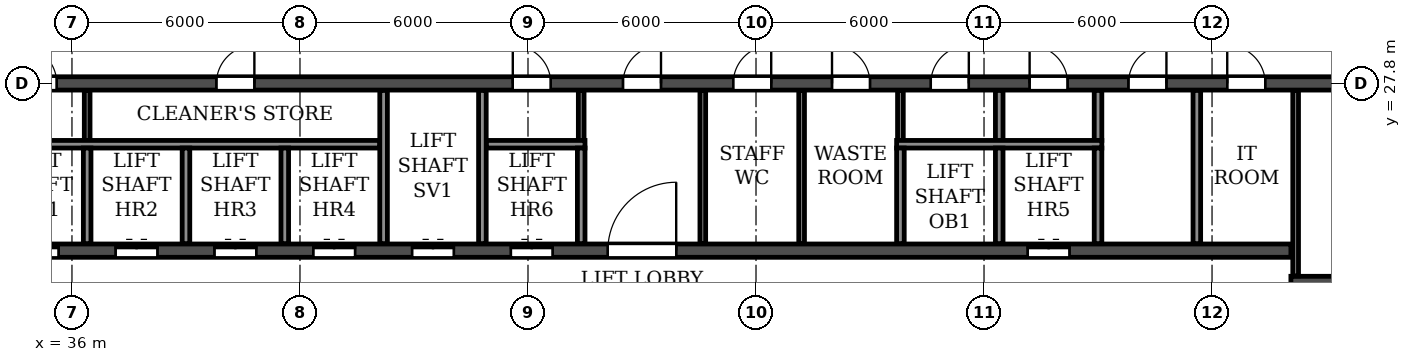
"""IFC4 building model, lengths in metres.
Left out: names, types, materials, properties, quantities, classifications, styles, units other than length and angle.
Written with IfcOpenShell. Run it as: python <this file> out.ifc"""

import sys

from ifc_helpers import new_model, si_unit, direction, frame, frame_2d, origin, place, context, subcontext, project, spatial, rectangle, extrude, element, fill, save


model = new_model("IFC4")
c1 = context("Model", 3, precision=1e-05, world=origin(), true_north=direction((0.0, 1.0)))
c2 = subcontext(c1, "Body", "Model", "MODEL_VIEW")
j1 = project(units=[si_unit("LENGTHUNIT", "METRE"), si_unit("PLANEANGLEUNIT", "RADIAN")], contexts=[c1])
p1 = place(None, origin())
s1 = spatial("IfcSite", under=j1, at=p1, CompositionType="ELEMENT")
p2 = place(p1, origin())
s2 = spatial("IfcBuilding", under=s1, at=p2, CompositionType="ELEMENT")
p3 = place(p2, frame((0.0, 0.0, 231.3)))
s3 = spatial("IfcBuildingStorey", under=s2, at=p3, CompositionType="ELEMENT", Elevation=231.3)
p4 = place(p3, frame((18.2, 27.8, 0.0), z_axis=(0.0, 0.0, 1.0), x_axis=(1.0, 0.0, 0.0)))
e1 = element("IfcWall", 1, at=p4, inside=s3, PredefinedType="SOLIDWALL", context=c2, shape_type="SweptSolid", body=[
    extrude(rectangle(XDim=65.6, YDim=0.35, at=frame_2d((32.8, 0.0))), origin(), (0.0, 0.0, 1.0), 3.08),
])
p5 = place(p4, frame((0.7, 0.0, 0.0)))
e2 = element("IfcOpeningElement", 2, at=p5, cuts=e1, PredefinedType="OPENING", context=c2, shape_type="SweptSolid", body=[
    extrude(rectangle(XDim=1.0, YDim=2.1, at=frame_2d((0.5, 1.05))), frame((0.0, 0.185, 0.0), z_axis=(0.0, -1.0, 0.0), x_axis=(1.0, 0.0, 0.0)), (0.0, 0.0, 1.0), 0.37),
])
p6 = place(p4, frame((4.05, 0.0, 0.0)))
e3 = element("IfcOpeningElement", 3, at=p6, cuts=e1, PredefinedType="OPENING", context=c2, shape_type="SweptSolid", body=[
    extrude(rectangle(XDim=0.9, YDim=2.1, at=frame_2d((0.45, 1.05))), frame((0.0, 0.185, 0.0), z_axis=(0.0, -1.0, 0.0), x_axis=(1.0, 0.0, 0.0)), (0.0, 0.0, 1.0), 0.37),
])
p7 = place(p4, frame((13.25, 0.0, 0.0)))
e4 = element("IfcOpeningElement", 4, at=p7, cuts=e1, PredefinedType="OPENING", context=c2, shape_type="SweptSolid", body=[
    extrude(rectangle(XDim=0.9, YDim=2.1, at=frame_2d((0.45, 1.05))), frame((0.0, 0.185, 0.0), z_axis=(0.0, -1.0, 0.0), x_axis=(1.0, 0.0, 0.0)), (0.0, 0.0, 1.0), 0.37),
])
p8 = place(p4, frame((16.4, 0.0, 0.0)))
e5 = element("IfcOpeningElement", 5, at=p8, cuts=e1, PredefinedType="OPENING", context=c2, shape_type="SweptSolid", body=[
    extrude(rectangle(XDim=1.0, YDim=2.1, at=frame_2d((0.5, 1.05))), frame((0.0, 0.185, 0.0), z_axis=(0.0, -1.0, 0.0), x_axis=(1.0, 0.0, 0.0)), (0.0, 0.0, 1.0), 0.37),
])
p9 = place(p4, frame((21.6, 0.0, 0.0)))
e6 = element("IfcOpeningElement", 6, at=p9, cuts=e1, PredefinedType="OPENING", context=c2, shape_type="SweptSolid", body=[
    extrude(rectangle(XDim=1.0, YDim=2.1, at=frame_2d((0.5, 1.05))), frame((0.0, 0.185, 0.0), z_axis=(0.0, -1.0, 0.0), x_axis=(1.0, 0.0, 0.0)), (0.0, 0.0, 1.0), 0.37),
])
p10 = place(p4, frame((29.4, 0.0, 0.0)))
e7 = element("IfcOpeningElement", 7, at=p10, cuts=e1, PredefinedType="OPENING", context=c2, shape_type="SweptSolid", body=[
    extrude(rectangle(XDim=1.0, YDim=2.1, at=frame_2d((0.5, 1.05))), frame((0.0, 0.185, 0.0), z_axis=(0.0, -1.0, 0.0), x_axis=(1.0, 0.0, 0.0)), (0.0, 0.0, 1.0), 0.37),
])
p11 = place(p4, frame((32.3, 0.0, 0.0)))
e8 = element("IfcOpeningElement", 8, at=p11, cuts=e1, PredefinedType="OPENING", context=c2, shape_type="SweptSolid", body=[
    extrude(rectangle(XDim=1.0, YDim=2.1, at=frame_2d((0.5, 1.05))), frame((0.0, 0.185, 0.0), z_axis=(0.0, -1.0, 0.0), x_axis=(1.0, 0.0, 0.0)), (0.0, 0.0, 1.0), 0.37),
])
p12 = place(p4, frame((35.2, 0.0, 0.0)))
e9 = element("IfcOpeningElement", 9, at=p12, cuts=e1, PredefinedType="OPENING", context=c2, shape_type="SweptSolid", body=[
    extrude(rectangle(XDim=1.0, YDim=2.1, at=frame_2d((0.5, 1.05))), frame((0.0, 0.185, 0.0), z_axis=(0.0, -1.0, 0.0), x_axis=(1.0, 0.0, 0.0)), (0.0, 0.0, 1.0), 0.37),
])
p13 = place(p4, frame((37.8, 0.0, 0.0)))
e10 = element("IfcOpeningElement", 10, at=p13, cuts=e1, PredefinedType="OPENING", context=c2, shape_type="SweptSolid", body=[
    extrude(rectangle(XDim=1.0, YDim=2.1, at=frame_2d((0.5, 1.05))), frame((0.0, 0.185, 0.0), z_axis=(0.0, -1.0, 0.0), x_axis=(1.0, 0.0, 0.0)), (0.0, 0.0, 1.0), 0.37),
])
p14 = place(p4, frame((40.4, 0.0, 0.0)))
e11 = element("IfcOpeningElement", 11, at=p14, cuts=e1, PredefinedType="OPENING", context=c2, shape_type="SweptSolid", body=[
    extrude(rectangle(XDim=1.0, YDim=2.1, at=frame_2d((0.5, 1.05))), frame((0.0, 0.185, 0.0), z_axis=(0.0, -1.0, 0.0), x_axis=(1.0, 0.0, 0.0)), (0.0, 0.0, 1.0), 0.37),
])
p15 = place(p4, frame((43.0, 0.0, 0.0)))
e12 = element("IfcOpeningElement", 12, at=p15, cuts=e1, PredefinedType="OPENING", context=c2, shape_type="SweptSolid", body=[
    extrude(rectangle(XDim=1.0, YDim=2.1, at=frame_2d((0.5, 1.05))), frame((0.0, 0.185, 0.0), z_axis=(0.0, -1.0, 0.0), x_axis=(1.0, 0.0, 0.0)), (0.0, 0.0, 1.0), 0.37),
])
p16 = place(p4, frame((45.6, 0.0, 0.0)))
e13 = element("IfcOpeningElement", 13, at=p16, cuts=e1, PredefinedType="OPENING", context=c2, shape_type="SweptSolid", body=[
    extrude(rectangle(XDim=1.0, YDim=2.1, at=frame_2d((0.5, 1.05))), frame((0.0, 0.185, 0.0), z_axis=(0.0, -1.0, 0.0), x_axis=(1.0, 0.0, 0.0)), (0.0, 0.0, 1.0), 0.37),
])
p17 = place(p4, frame((48.2, 0.0, 0.0)))
e14 = element("IfcOpeningElement", 14, at=p17, cuts=e1, PredefinedType="OPENING", context=c2, shape_type="SweptSolid", body=[
    extrude(rectangle(XDim=1.0, YDim=2.1, at=frame_2d((0.5, 1.05))), frame((0.0, 0.185, 0.0), z_axis=(0.0, -1.0, 0.0), x_axis=(1.0, 0.0, 0.0)), (0.0, 0.0, 1.0), 0.37),
])
p18 = place(p4, frame((51.45, 0.0, 0.0)))
e15 = element("IfcOpeningElement", 15, at=p18, cuts=e1, PredefinedType="OPENING", context=c2, shape_type="SweptSolid", body=[
    extrude(rectangle(XDim=0.9, YDim=2.1, at=frame_2d((0.45, 1.05))), frame((0.0, 0.185, 0.0), z_axis=(0.0, -1.0, 0.0), x_axis=(1.0, 0.0, 0.0)), (0.0, 0.0, 1.0), 0.37),
])
p19 = place(p4, frame((60.65, 0.0, 0.0)))
e16 = element("IfcOpeningElement", 16, at=p19, cuts=e1, PredefinedType="OPENING", context=c2, shape_type="SweptSolid", body=[
    extrude(rectangle(XDim=0.9, YDim=2.1, at=frame_2d((0.45, 1.05))), frame((0.0, 0.185, 0.0), z_axis=(0.0, -1.0, 0.0), x_axis=(1.0, 0.0, 0.0)), (0.0, 0.0, 1.0), 0.37),
])
p20 = place(p4, frame((63.9, 0.0, 0.0)))
e17 = element("IfcOpeningElement", 17, at=p20, cuts=e1, PredefinedType="OPENING", context=c2, shape_type="SweptSolid", body=[
    extrude(rectangle(XDim=1.0, YDim=2.1, at=frame_2d((0.5, 1.05))), frame((0.0, 0.185, 0.0), z_axis=(0.0, -1.0, 0.0), x_axis=(1.0, 0.0, 0.0)), (0.0, 0.0, 1.0), 0.37),
])
p21 = place(p3, frame((33.925, 23.4, 0.0), z_axis=(0.0, 0.0, 1.0), x_axis=(1.0, 0.0, 0.0)))
e18 = element("IfcWall", 18, at=p21, inside=s3, PredefinedType="SOLIDWALL", context=c2, shape_type="SweptSolid", body=[
    extrude(rectangle(XDim=34.15, YDim=0.35, at=frame_2d((17.075, 0.0))), origin(), (0.0, 0.0, 1.0), 3.08),
])
p22 = place(p21, frame((16.175, 0.0, 0.0)))
e19 = element("IfcOpeningElement", 19, at=p22, cuts=e18, PredefinedType="OPENING", context=c2, shape_type="SweptSolid", body=[
    extrude(rectangle(XDim=1.8, YDim=2.1, at=frame_2d((0.9, 1.05))), frame((0.0, 0.185, 0.0), z_axis=(0.0, -1.0, 0.0), x_axis=(1.0, 0.0, 0.0)), (0.0, 0.0, 1.0), 0.37),
])
p23 = place(p21, frame((0.625, 0.0, 0.0)))
e20 = element("IfcOpeningElement", 20, at=p23, cuts=e18, PredefinedType="OPENING", context=c2, shape_type="SweptSolid", body=[
    extrude(rectangle(XDim=1.1, YDim=2.1, at=frame_2d((0.55, 1.05))), frame((0.0, 0.185, 0.0), z_axis=(0.0, -1.0, 0.0), x_axis=(1.0, 0.0, 0.0)), (0.0, 0.0, 1.0), 0.37),
])
p24 = place(p21, frame((3.225, 0.0, 0.0)))
e21 = element("IfcOpeningElement", 21, at=p24, cuts=e18, PredefinedType="OPENING", context=c2, shape_type="SweptSolid", body=[
    extrude(rectangle(XDim=1.1, YDim=2.1, at=frame_2d((0.55, 1.05))), frame((0.0, 0.185, 0.0), z_axis=(0.0, -1.0, 0.0), x_axis=(1.0, 0.0, 0.0)), (0.0, 0.0, 1.0), 0.37),
])
p25 = place(p21, frame((5.825, 0.0, 0.0)))
e22 = element("IfcOpeningElement", 22, at=p25, cuts=e18, PredefinedType="OPENING", context=c2, shape_type="SweptSolid", body=[
    extrude(rectangle(XDim=1.1, YDim=2.1, at=frame_2d((0.55, 1.05))), frame((0.0, 0.185, 0.0), z_axis=(0.0, -1.0, 0.0), x_axis=(1.0, 0.0, 0.0)), (0.0, 0.0, 1.0), 0.37),
])
p26 = place(p21, frame((8.425, 0.0, 0.0)))
e23 = element("IfcOpeningElement", 23, at=p26, cuts=e18, PredefinedType="OPENING", context=c2, shape_type="SweptSolid", body=[
    extrude(rectangle(XDim=1.1, YDim=2.1, at=frame_2d((0.55, 1.05))), frame((0.0, 0.185, 0.0), z_axis=(0.0, -1.0, 0.0), x_axis=(1.0, 0.0, 0.0)), (0.0, 0.0, 1.0), 0.37),
])
p27 = place(p21, frame((11.025, 0.0, 0.0)))
e24 = element("IfcOpeningElement", 24, at=p27, cuts=e18, PredefinedType="OPENING", context=c2, shape_type="SweptSolid", body=[
    extrude(rectangle(XDim=1.1, YDim=2.1, at=frame_2d((0.55, 1.05))), frame((0.0, 0.185, 0.0), z_axis=(0.0, -1.0, 0.0), x_axis=(1.0, 0.0, 0.0)), (0.0, 0.0, 1.0), 0.37),
])
p28 = place(p21, frame((13.625, 0.0, 0.0)))
e25 = element("IfcOpeningElement", 25, at=p28, cuts=e18, PredefinedType="OPENING", context=c2, shape_type="SweptSolid", body=[
    extrude(rectangle(XDim=1.1, YDim=2.1, at=frame_2d((0.55, 1.05))), frame((0.0, 0.185, 0.0), z_axis=(0.0, -1.0, 0.0), x_axis=(1.0, 0.0, 0.0)), (0.0, 0.0, 1.0), 0.37),
])
p29 = place(p21, frame((27.225, 0.0, 0.0)))
e26 = element("IfcOpeningElement", 26, at=p29, cuts=e18, PredefinedType="OPENING", context=c2, shape_type="SweptSolid", body=[
    extrude(rectangle(XDim=1.1, YDim=2.1, at=frame_2d((0.55, 1.05))), frame((0.0, 0.185, 0.0), z_axis=(0.0, -1.0, 0.0), x_axis=(1.0, 0.0, 0.0)), (0.0, 0.0, 1.0), 0.37),
])
p30 = place(p3, frame((68.075, 22.6, 0.0), z_axis=(0.0, 0.0, 1.0), x_axis=(1.0, 0.0, 0.0)))
e27 = element("IfcWall", 27, at=p30, inside=s3, PredefinedType="SOLIDWALL", context=c2, shape_type="SweptSolid", body=[
    extrude(rectangle(XDim=4.05, YDim=0.25, at=frame_2d((2.025, 0.0))), origin(), (0.0, 0.0, 1.0), 3.08),
])
p31 = place(p3, frame((49.4, 26.3, 0.0), z_axis=(0.0, 0.0, 1.0), x_axis=(0.0, 1.0, 0.0)))
e28 = element("IfcWall", 28, at=p31, inside=s3, PredefinedType="PARTITIONING", context=c2, shape_type="SweptSolid", body=[
    extrude(rectangle(XDim=1.315, YDim=0.15, at=frame_2d((0.657, 0.0))), origin(), (0.0, 0.0, 1.0), 3.08),
])
p32 = place(p3, frame((52.6, 23.585, 0.0), z_axis=(0.0, 0.0, 1.0), x_axis=(0.0, 1.0, 0.0)))
e29 = element("IfcWall", 29, at=p32, inside=s3, PredefinedType="PARTITIONING", context=c2, shape_type="SweptSolid", body=[
    extrude(rectangle(XDim=4.03, YDim=0.15, at=frame_2d((2.015, 0.0))), origin(), (0.0, 0.0, 1.0), 3.08),
])
p33 = place(p3, frame((36.4, 26.3, 0.0), z_axis=(0.0, 0.0, 1.0), x_axis=(0.0, 1.0, 0.0)))
e30 = element("IfcWall", 30, at=p33, inside=s3, PredefinedType="PARTITIONING", context=c2, shape_type="SweptSolid", body=[
    extrude(rectangle(XDim=1.315, YDim=0.15, at=frame_2d((0.657, 0.0))), origin(), (0.0, 0.0, 1.0), 3.08),
])
p34 = place(p3, frame((55.2, 23.585, 0.0), z_axis=(0.0, 0.0, 1.0), x_axis=(0.0, 1.0, 0.0)))
e31 = element("IfcWall", 31, at=p34, inside=s3, PredefinedType="PARTITIONING", context=c2, shape_type="SweptSolid", body=[
    extrude(rectangle(XDim=4.03, YDim=0.15, at=frame_2d((2.015, 0.0))), origin(), (0.0, 0.0, 1.0), 3.08),
])
p35 = place(p3, frame((57.8, 26.3, 0.0), z_axis=(0.0, 0.0, 1.0), x_axis=(0.0, 1.0, 0.0)))
e32 = element("IfcWall", 32, at=p35, inside=s3, PredefinedType="PARTITIONING", context=c2, shape_type="SweptSolid", body=[
    extrude(rectangle(XDim=1.315, YDim=0.15, at=frame_2d((0.657, 0.0))), origin(), (0.0, 0.0, 1.0), 3.08),
])
for number, where, z_axis, x_axis in (
    (33, (60.4, 26.3, 0.0), (0.0, 0.0, 1.0), (0.0, 1.0, 0.0)),
    (34, (63.0, 26.3, 0.0), (0.0, 0.0, 1.0), (0.0, 1.0, 0.0)),
):
    element("IfcWall", number, at=place(p3, frame(where, z_axis=z_axis, x_axis=x_axis)), inside=s3, PredefinedType="PARTITIONING", context=c2, shape_type="SweptSolid", body=[
        extrude(rectangle(XDim=1.315, YDim=0.2, at=frame_2d((0.657, 0.0))), origin(), (0.0, 0.0, 1.0), 3.08),
    ])
p36 = place(p3, frame((65.6, 23.585, 0.0), z_axis=(0.0, 0.0, 1.0), x_axis=(0.0, 1.0, 0.0)))
e35 = element("IfcWall", 35, at=p36, inside=s3, PredefinedType="PARTITIONING", context=c2, shape_type="SweptSolid", body=[
    extrude(rectangle(XDim=4.03, YDim=0.2, at=frame_2d((2.015, 0.0))), origin(), (0.0, 0.0, 1.0), 3.08),
])
p37 = place(p3, frame((68.2, 22.735, 0.0), z_axis=(0.0, 0.0, 1.0), x_axis=(0.0, 1.0, 0.0)))
e36 = element("IfcWall", 36, at=p37, inside=s3, PredefinedType="PARTITIONING", context=c2, shape_type="SweptSolid", body=[
    extrude(rectangle(XDim=4.88, YDim=0.15, at=frame_2d((2.44, 0.0))), origin(), (0.0, 0.0, 1.0), 3.08),
])
p38 = place(p3, frame((33.7, 26.2, 0.0), z_axis=(0.0, 0.0, 1.0), x_axis=(1.0, 0.0, 0.0)))
e37 = element("IfcWall", 37, at=p38, inside=s3, PredefinedType="PARTITIONING", context=c2, shape_type="SweptSolid", body=[
    extrude(rectangle(XDim=10.4, YDim=0.2, at=frame_2d((5.2, 0.0))), origin(), (0.0, 0.0, 1.0), 3.08),
])
p39 = place(p3, frame((46.9, 26.2, 0.0), z_axis=(0.0, 0.0, 1.0), x_axis=(1.0, 0.0, 0.0)))
e38 = element("IfcWall", 38, at=p39, inside=s3, PredefinedType="PARTITIONING", context=c2, shape_type="SweptSolid", body=[
    extrude(rectangle(XDim=2.6, YDim=0.2, at=frame_2d((1.3, 0.0))), origin(), (0.0, 0.0, 1.0), 3.08),
])
p40 = place(p3, frame((57.7, 26.2, 0.0), z_axis=(0.0, 0.0, 1.0), x_axis=(1.0, 0.0, 0.0)))
e39 = element("IfcWall", 39, at=p40, inside=s3, PredefinedType="PARTITIONING", context=c2, shape_type="SweptSolid", body=[
    extrude(rectangle(XDim=5.4, YDim=0.2, at=frame_2d((2.7, 0.0))), origin(), (0.0, 0.0, 1.0), 3.08),
])
for number, where, z_axis, x_axis in (
    (40, (36.4, 23.585, 0.0), (0.0, 0.0, 1.0), (0.0, 1.0, 0.0)),
    (41, (39.0, 23.585, 0.0), (0.0, 0.0, 1.0), (0.0, 1.0, 0.0)),
    (42, (41.6, 23.585, 0.0), (0.0, 0.0, 1.0), (0.0, 1.0, 0.0)),
):
    element("IfcWall", number, at=place(p3, frame(where, z_axis=z_axis, x_axis=x_axis)), inside=s3, PredefinedType="PARTITIONING", context=c2, shape_type="SweptSolid", body=[
        extrude(rectangle(XDim=2.515, YDim=0.2, at=frame_2d((1.258, 0.0))), origin(), (0.0, 0.0, 1.0), 3.08),
    ])
for number, where, z_axis, x_axis in (
    (43, (44.2, 23.585, 0.0), (0.0, 0.0, 1.0), (0.0, 1.0, 0.0)),
    (44, (46.8, 23.585, 0.0), (0.0, 0.0, 1.0), (0.0, 1.0, 0.0)),
):
    element("IfcWall", number, at=place(p3, frame(where, z_axis=z_axis, x_axis=x_axis)), inside=s3, PredefinedType="PARTITIONING", context=c2, shape_type="SweptSolid", body=[
        extrude(rectangle(XDim=4.03, YDim=0.2, at=frame_2d((2.015, 0.0))), origin(), (0.0, 0.0, 1.0), 3.08),
    ])
for number, where, z_axis, x_axis in (
    (45, (49.4, 23.585, 0.0), (0.0, 0.0, 1.0), (0.0, 1.0, 0.0)),
    (46, (57.8, 23.585, 0.0), (0.0, 0.0, 1.0), (0.0, 1.0, 0.0)),
    (47, (60.4, 23.585, 0.0), (0.0, 0.0, 1.0), (0.0, 1.0, 0.0)),
    (48, (63.0, 23.585, 0.0), (0.0, 0.0, 1.0), (0.0, 1.0, 0.0)),
):
    element("IfcWall", number, at=place(p3, frame(where, z_axis=z_axis, x_axis=x_axis)), inside=s3, PredefinedType="PARTITIONING", context=c2, shape_type="SweptSolid", body=[
        extrude(rectangle(XDim=2.515, YDim=0.2, at=frame_2d((1.258, 0.0))), origin(), (0.0, 0.0, 1.0), 3.08),
    ])
p41 = place(p8, origin())
e49 = element("IfcDoor", 49, at=p41, inside=s3, OperationType="SINGLE_SWING_LEFT", PredefinedType="DOOR", context=c2, shape_type="SweptSolid", body=[
    extrude(rectangle(XDim=1.0, YDim=2.1, at=frame_2d((0.5, 1.05))), frame((0.0, 0.025, 0.0), z_axis=(0.0, -1.0, 0.0), x_axis=(1.0, 0.0, 0.0)), (0.0, 0.0, 1.0), 0.05),
])
fill(e5, e49)
p42 = place(p9, origin())
e50 = element("IfcDoor", 50, at=p42, inside=s3, OperationType="SINGLE_SWING_RIGHT", PredefinedType="DOOR", context=c2, shape_type="SweptSolid", body=[
    extrude(rectangle(XDim=1.0, YDim=2.1, at=frame_2d((0.5, 1.05))), frame((0.0, 0.025, 0.0), z_axis=(0.0, -1.0, 0.0), x_axis=(1.0, 0.0, 0.0)), (0.0, 0.0, 1.0), 0.05),
])
fill(e6, e50)
p43 = place(p10, origin())
e51 = element("IfcDoor", 51, at=p43, inside=s3, OperationType="SINGLE_SWING_LEFT", PredefinedType="DOOR", context=c2, shape_type="SweptSolid", body=[
    extrude(rectangle(XDim=1.0, YDim=2.1, at=frame_2d((0.5, 1.05))), frame((0.0, 0.025, 0.0), z_axis=(0.0, -1.0, 0.0), x_axis=(1.0, 0.0, 0.0)), (0.0, 0.0, 1.0), 0.05),
])
fill(e7, e51)
p44 = place(p11, origin())
e52 = element("IfcDoor", 52, at=p44, inside=s3, OperationType="SINGLE_SWING_RIGHT", PredefinedType="DOOR", context=c2, shape_type="SweptSolid", body=[
    extrude(rectangle(XDim=1.0, YDim=2.1, at=frame_2d((0.5, 1.05))), frame((0.0, 0.025, 0.0), z_axis=(0.0, -1.0, 0.0), x_axis=(1.0, 0.0, 0.0)), (0.0, 0.0, 1.0), 0.05),
])
fill(e8, e52)
p45 = place(p12, origin())
e53 = element("IfcDoor", 53, at=p45, inside=s3, OperationType="SINGLE_SWING_RIGHT", PredefinedType="DOOR", context=c2, shape_type="SweptSolid", body=[
    extrude(rectangle(XDim=1.0, YDim=2.1, at=frame_2d((0.5, 1.05))), frame((0.0, 0.025, 0.0), z_axis=(0.0, -1.0, 0.0), x_axis=(1.0, 0.0, 0.0)), (0.0, 0.0, 1.0), 0.05),
])
fill(e9, e53)
p46 = place(p13, origin())
e54 = element("IfcDoor", 54, at=p46, inside=s3, OperationType="SINGLE_SWING_LEFT", PredefinedType="DOOR", context=c2, shape_type="SweptSolid", body=[
    extrude(rectangle(XDim=1.0, YDim=2.1, at=frame_2d((0.5, 1.05))), frame((0.0, 0.025, 0.0), z_axis=(0.0, -1.0, 0.0), x_axis=(1.0, 0.0, 0.0)), (0.0, 0.0, 1.0), 0.05),
])
fill(e10, e54)
p47 = place(p14, origin())
e55 = element("IfcDoor", 55, at=p47, inside=s3, OperationType="SINGLE_SWING_RIGHT", PredefinedType="DOOR", context=c2, shape_type="SweptSolid", body=[
    extrude(rectangle(XDim=1.0, YDim=2.1, at=frame_2d((0.5, 1.05))), frame((0.0, 0.025, 0.0), z_axis=(0.0, -1.0, 0.0), x_axis=(1.0, 0.0, 0.0)), (0.0, 0.0, 1.0), 0.05),
])
fill(e11, e55)
p48 = place(p15, origin())
e56 = element("IfcDoor", 56, at=p48, inside=s3, OperationType="SINGLE_SWING_LEFT", PredefinedType="DOOR", context=c2, shape_type="SweptSolid", body=[
    extrude(rectangle(XDim=1.0, YDim=2.1, at=frame_2d((0.5, 1.05))), frame((0.0, 0.025, 0.0), z_axis=(0.0, -1.0, 0.0), x_axis=(1.0, 0.0, 0.0)), (0.0, 0.0, 1.0), 0.05),
])
fill(e12, e56)
p49 = place(p16, origin())
e57 = element("IfcDoor", 57, at=p49, inside=s3, OperationType="SINGLE_SWING_RIGHT", PredefinedType="DOOR", context=c2, shape_type="SweptSolid", body=[
    extrude(rectangle(XDim=1.0, YDim=2.1, at=frame_2d((0.5, 1.05))), frame((0.0, 0.025, 0.0), z_axis=(0.0, -1.0, 0.0), x_axis=(1.0, 0.0, 0.0)), (0.0, 0.0, 1.0), 0.05),
])
fill(e13, e57)
p50 = place(p17, origin())
e58 = element("IfcDoor", 58, at=p50, inside=s3, OperationType="SINGLE_SWING_LEFT", PredefinedType="DOOR", context=c2, shape_type="SweptSolid", body=[
    extrude(rectangle(XDim=1.0, YDim=2.1, at=frame_2d((0.5, 1.05))), frame((0.0, 0.025, 0.0), z_axis=(0.0, -1.0, 0.0), x_axis=(1.0, 0.0, 0.0)), (0.0, 0.0, 1.0), 0.05),
])
fill(e14, e58)
p51 = place(p22, origin())
e59 = element("IfcDoor", 59, at=p51, inside=s3, OperationType="DOUBLE_DOOR_SINGLE_SWING", PredefinedType="DOOR", context=c2, shape_type="SweptSolid", body=[
    extrude(rectangle(XDim=1.8, YDim=2.1, at=frame_2d((0.9, 1.05))), frame((0.0, 0.025, 0.0), z_axis=(0.0, -1.0, 0.0), x_axis=(1.0, 0.0, 0.0)), (0.0, 0.0, 1.0), 0.05),
])
fill(e19, e59)
p52 = place(p23, origin())
e60 = element("IfcDoor", 60, at=p52, inside=s3, OperationType="DOUBLE_DOOR_SLIDING", PredefinedType="DOOR", context=c2, shape_type="SweptSolid", body=[
    extrude(rectangle(XDim=1.1, YDim=2.1, at=frame_2d((0.55, 1.05))), frame((0.0, 0.025, 0.0), z_axis=(0.0, -1.0, 0.0), x_axis=(1.0, 0.0, 0.0)), (0.0, 0.0, 1.0), 0.05),
])
fill(e20, e60)
p53 = place(p24, origin())
e61 = element("IfcDoor", 61, at=p53, inside=s3, OperationType="DOUBLE_DOOR_SLIDING", PredefinedType="DOOR", context=c2, shape_type="SweptSolid", body=[
    extrude(rectangle(XDim=1.1, YDim=2.1, at=frame_2d((0.55, 1.05))), frame((0.0, 0.025, 0.0), z_axis=(0.0, -1.0, 0.0), x_axis=(1.0, 0.0, 0.0)), (0.0, 0.0, 1.0), 0.05),
])
fill(e21, e61)
p54 = place(p25, origin())
e62 = element("IfcDoor", 62, at=p54, inside=s3, OperationType="DOUBLE_DOOR_SLIDING", PredefinedType="DOOR", context=c2, shape_type="SweptSolid", body=[
    extrude(rectangle(XDim=1.1, YDim=2.1, at=frame_2d((0.55, 1.05))), frame((0.0, 0.025, 0.0), z_axis=(0.0, -1.0, 0.0), x_axis=(1.0, 0.0, 0.0)), (0.0, 0.0, 1.0), 0.05),
])
fill(e22, e62)
p55 = place(p26, origin())
e63 = element("IfcDoor", 63, at=p55, inside=s3, OperationType="DOUBLE_DOOR_SLIDING", PredefinedType="DOOR", context=c2, shape_type="SweptSolid", body=[
    extrude(rectangle(XDim=1.1, YDim=2.1, at=frame_2d((0.55, 1.05))), frame((0.0, 0.025, 0.0), z_axis=(0.0, -1.0, 0.0), x_axis=(1.0, 0.0, 0.0)), (0.0, 0.0, 1.0), 0.05),
])
fill(e23, e63)
p56 = place(p27, origin())
e64 = element("IfcDoor", 64, at=p56, inside=s3, OperationType="DOUBLE_DOOR_SLIDING", PredefinedType="DOOR", context=c2, shape_type="SweptSolid", body=[
    extrude(rectangle(XDim=1.1, YDim=2.1, at=frame_2d((0.55, 1.05))), frame((0.0, 0.025, 0.0), z_axis=(0.0, -1.0, 0.0), x_axis=(1.0, 0.0, 0.0)), (0.0, 0.0, 1.0), 0.05),
])
fill(e24, e64)
p57 = place(p28, origin())
e65 = element("IfcDoor", 65, at=p57, inside=s3, OperationType="DOUBLE_DOOR_SLIDING", PredefinedType="DOOR", context=c2, shape_type="SweptSolid", body=[
    extrude(rectangle(XDim=1.1, YDim=2.1, at=frame_2d((0.55, 1.05))), frame((0.0, 0.025, 0.0), z_axis=(0.0, -1.0, 0.0), x_axis=(1.0, 0.0, 0.0)), (0.0, 0.0, 1.0), 0.05),
])
fill(e25, e65)
p58 = place(p29, origin())
e66 = element("IfcDoor", 66, at=p58, inside=s3, OperationType="DOUBLE_DOOR_SLIDING", PredefinedType="DOOR", context=c2, shape_type="SweptSolid", body=[
    extrude(rectangle(XDim=1.1, YDim=2.1, at=frame_2d((0.55, 1.05))), frame((0.0, 0.025, 0.0), z_axis=(0.0, -1.0, 0.0), x_axis=(1.0, 0.0, 0.0)), (0.0, 0.0, 1.0), 0.05),
])
fill(e26, e66)
save(model, sys.argv[1])
